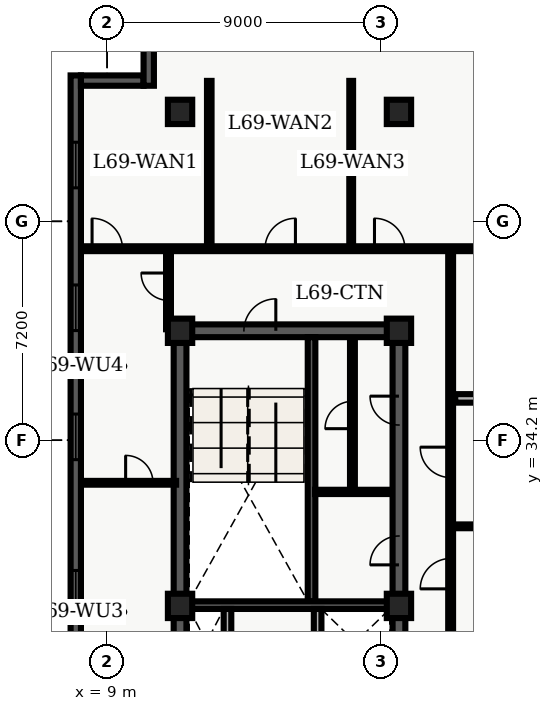
"""IFC4 building model, lengths in metres.
Left out: names, types, materials, properties, quantities, classifications, styles, units other than length and angle.
Written with IfcOpenShell. Run it as: python <this file> out.ifc"""

import sys

from ifc_helpers import new_model, entity, si_unit, converted_unit, direction, frame, origin_with_axes, origin_2d_with_axis, place, context, subcontext, project, spatial, polyline, rectangle, outline, extrude, element, fill, save


model = new_model("IFC4")
c1 = context("Model", 3, precision=1e-05, world=origin_with_axes(), true_north=direction((0.0, 1.0)))
c2 = subcontext(c1, "Body", "Model", "MODEL_VIEW")
j1 = project(units=[si_unit("LENGTHUNIT", "METRE"), converted_unit("PLANEANGLEUNIT", "DEGREE", entity("IfcPlaneAngleMeasure", 0.017), si_unit("PLANEANGLEUNIT", "RADIAN"), dimensions=[0, 0, 0, 0, 0, 0, 0])], contexts=[c1])
p1 = place(None, origin_with_axes())
s1 = spatial("IfcSite", under=j1, at=p1, CompositionType="ELEMENT")
p2 = place(p1, origin_with_axes())
s2 = spatial("IfcBuilding", under=s1, at=p2, CompositionType="ELEMENT")
p3 = place(p2, frame((0.0, 0.0, 280.2), z_axis=(0.0, 0.0, 1.0), x_axis=(1.0, 0.0, 0.0)))
s3 = spatial("IfcBuildingStorey", under=s2, at=p3, CompositionType="ELEMENT", Elevation=280.2)
p4 = place(p3, frame((11.4, 10.8, 0.0), z_axis=(0.0, 0.0, 1.0), x_axis=(0.0, 1.0, 0.0)))
e1 = element("IfcWall", 1, at=p4, inside=s3, PredefinedType="SHEAR", context=c2, shape_type="SweptSolid", body=[
    extrude(outline(polyline([(0.0, -0.21), (27.0, -0.21), (27.0, 0.21), (0.0, 0.21), (0.0, -0.21)])), origin_with_axes(), (0.0, 0.0, 1.0), 3.66),
])
p5 = place(p3, frame((11.4, 37.8, 0.0), z_axis=(0.0, 0.0, 1.0), x_axis=(1.0, 0.0, 0.0)))
e2 = element("IfcWall", 2, at=p5, inside=s3, PredefinedType="SHEAR", context=c2, shape_type="SweptSolid", body=[
    extrude(outline(polyline([(0.0, -0.21), (7.2, -0.21), (7.2, 0.21), (0.0, 0.21), (0.0, -0.21)])), origin_with_axes(), (0.0, 0.0, 1.0), 3.66),
])
p6 = place(p5, frame((2.625, 0.0, 0.0), z_axis=(0.0, 0.0, 1.0), x_axis=(1.0, 0.0, 0.0)))
e3 = element("IfcOpeningElement", 3, at=p6, cuts=e2, PredefinedType="OPENING", context=c2, shape_type="SweptSolid", body=[
    extrude(rectangle(XDim=1.05, YDim=0.44, at=origin_2d_with_axis()), origin_with_axes(), (0.0, 0.0, 1.0), 2.15),
])
p7 = place(p3, frame((18.6, 24.3, 0.0), z_axis=(0.0, 0.0, 1.0), x_axis=(0.0, 1.0, 0.0)))
e4 = element("IfcWall", 4, at=p7, inside=s3, PredefinedType="SHEAR", context=c2, shape_type="SweptSolid", body=[
    extrude(outline(polyline([(0.0, -0.21), (13.5, -0.21), (13.5, 0.21), (0.0, 0.21), (0.0, -0.21)])), origin_with_axes(), (0.0, 0.0, 1.0), 3.66),
])
p8 = place(p7, frame((6.275, 0.0, 0.0), z_axis=(0.0, 0.0, 1.0), x_axis=(1.0, 0.0, 0.0)))
e5 = element("IfcOpeningElement", 5, at=p8, cuts=e4, PredefinedType="OPENING", context=c2, shape_type="SweptSolid", body=[
    extrude(rectangle(XDim=0.95, YDim=0.44, at=origin_2d_with_axis()), origin_with_axes(), (0.0, 0.0, 1.0), 2.15),
])
p9 = place(p7, frame((10.875, 0.0, 0.0), z_axis=(0.0, 0.0, 1.0), x_axis=(1.0, 0.0, 0.0)))
e6 = element("IfcOpeningElement", 6, at=p9, cuts=e4, PredefinedType="OPENING", context=c2, shape_type="SweptSolid", body=[
    extrude(rectangle(XDim=0.95, YDim=0.44, at=origin_2d_with_axis()), origin_with_axes(), (0.0, 0.0, 1.0), 2.15),
])
p10 = place(p3, frame((15.725, 28.9, 0.0), z_axis=(0.0, 0.0, 1.0), x_axis=(0.0, 1.0, 0.0)))
e7 = element("IfcWall", 7, at=p10, inside=s3, PredefinedType="SHEAR", context=c2, shape_type="SweptSolid", body=[
    extrude(outline(polyline([(0.0, -0.125), (8.69, -0.125), (8.69, 0.125), (0.0, 0.125), (0.0, -0.125)])), origin_with_axes(), (0.0, 0.0, 1.0), 3.66),
])
p11 = place(p3, frame((11.61, 28.775, 0.0), z_axis=(0.0, 0.0, 1.0), x_axis=(1.0, 0.0, 0.0)))
e8 = element("IfcWall", 8, at=p11, inside=s3, PredefinedType="SHEAR", context=c2, shape_type="SweptSolid", body=[
    extrude(outline(polyline([(0.0, -0.125), (6.78, -0.125), (6.78, 0.125), (0.0, 0.125), (0.0, -0.125)])), origin_with_axes(), (0.0, 0.0, 1.0), 3.66),
])
for number, where, z_axis, x_axis in (
    (9, (12.96, 26.45, 0.0), (0.0, 0.0, 1.0), (0.0, 1.0, 0.0)),
    (10, (15.925, 26.45, 0.0), (0.0, 0.0, 1.0), (0.0, 1.0, 0.0)),
):
    element("IfcWall", number, at=place(p3, frame(where, z_axis=z_axis, x_axis=x_axis)), inside=s3, PredefinedType="SOLIDWALL", context=c2, shape_type="SweptSolid", body=[
        extrude(outline(polyline([(0.0, -0.125), (2.2, -0.125), (2.2, 0.125), (0.0, 0.125), (0.0, -0.125)])), origin_with_axes(), (0.0, 0.0, 1.0), 2.7),
    ])
for number, where, z_axis, x_axis in (
    (11, (11.4, 28.75, 0.0), (0.0, 0.0, 1.0), (1.0, 0.0, 0.0)),
    (12, (11.4, 37.8, 0.0), (0.0, 0.0, 1.0), (1.0, 0.0, 0.0)),
    (13, (11.4, 45.0, 0.0), (0.0, 0.0, 1.0), (1.0, 0.0, 0.0)),
    (14, (18.6, 28.75, 0.0), (0.0, 0.0, 1.0), (1.0, 0.0, 0.0)),
    (15, (18.6, 37.8, 0.0), (0.0, 0.0, 1.0), (1.0, 0.0, 0.0)),
    (16, (18.6, 45.0, 0.0), (0.0, 0.0, 1.0), (1.0, 0.0, 0.0)),
):
    element("IfcColumn", number, at=place(p3, frame(where, z_axis=z_axis, x_axis=x_axis)), inside=s3, PredefinedType="COLUMN", context=c2, shape_type="SweptSolid", body=[
        extrude(rectangle(XDim=0.8, YDim=0.8, at=origin_2d_with_axis()), origin_with_axes(), (0.0, 0.0, 1.0), 3.9),
    ])
p12 = place(p3, frame((15.84, 32.5, 0.0), z_axis=(0.0, 0.0, 1.0), x_axis=(1.0, 0.0, 0.0)))
e17 = element("IfcWall", 17, at=p12, inside=s3, PredefinedType="PARTITIONING", context=c2, shape_type="SweptSolid", body=[
    extrude(outline(polyline([(0.0, -0.07), (2.46, -0.07), (2.46, 0.07), (0.0, 0.07), (0.0, -0.07)])), origin_with_axes(), (0.0, 0.0, 1.0), 2.7),
])
p13 = place(p3, frame((17.07, 32.58, 0.0), z_axis=(0.0, 0.0, 1.0), x_axis=(0.0, 1.0, 0.0)))
e18 = element("IfcWall", 18, at=p13, inside=s3, PredefinedType="PARTITIONING", context=c2, shape_type="SweptSolid", body=[
    extrude(outline(polyline([(0.0, -0.08), (4.92, -0.08), (4.92, 0.08), (0.0, 0.08), (0.0, -0.08)])), origin_with_axes(), (0.0, 0.0, 1.0), 2.7),
])
p14 = place(p13, frame((2.45, 0.0, 0.0), z_axis=(0.0, 0.0, 1.0), x_axis=(1.0, 0.0, 0.0)))
e19 = element("IfcOpeningElement", 19, at=p14, cuts=e18, PredefinedType="OPENING", context=c2, shape_type="SweptSolid", body=[
    extrude(rectangle(XDim=0.9, YDim=0.18, at=origin_2d_with_axis()), origin_with_axes(), (0.0, 0.0, 1.0), 2.15),
])
p15 = place(p3, frame((8.135, 40.5, 0.0), z_axis=(0.0, 0.0, 1.0), x_axis=(1.0, 0.0, 0.0)))
e20 = element("IfcWall", 20, at=p15, inside=s3, PredefinedType="PARTITIONING", context=c2, shape_type="SweptSolid", body=[
    extrude(outline(polyline([(0.0, -0.08), (23.93, -0.08), (23.93, 0.08), (0.0, 0.08), (0.0, -0.08)])), origin_with_axes(), (0.0, 0.0, 1.0), 2.7),
])
p16 = place(p15, frame((0.871, 0.0, 0.0), z_axis=(0.0, 0.0, 1.0), x_axis=(1.0, 0.0, 0.0)))
e21 = element("IfcOpeningElement", 21, at=p16, cuts=e20, PredefinedType="OPENING", context=c2, shape_type="SweptSolid", body=[
    extrude(rectangle(XDim=1.0, YDim=0.18, at=origin_2d_with_axis()), origin_with_axes(), (0.0, 0.0, 1.0), 2.15),
])
p17 = place(p15, frame((6.56, 0.0, 0.0), z_axis=(0.0, 0.0, 1.0), x_axis=(1.0, 0.0, 0.0)))
e22 = element("IfcOpeningElement", 22, at=p17, cuts=e20, PredefinedType="OPENING", context=c2, shape_type="SweptSolid", body=[
    extrude(rectangle(XDim=1.0, YDim=0.18, at=origin_2d_with_axis()), origin_with_axes(), (0.0, 0.0, 1.0), 2.15),
])
p18 = place(p15, frame((10.16, 0.0, 0.0), z_axis=(0.0, 0.0, 1.0), x_axis=(1.0, 0.0, 0.0)))
e23 = element("IfcOpeningElement", 23, at=p18, cuts=e20, PredefinedType="OPENING", context=c2, shape_type="SweptSolid", body=[
    extrude(rectangle(XDim=1.0, YDim=0.18, at=origin_2d_with_axis()), origin_with_axes(), (0.0, 0.0, 1.0), 2.15),
])
p19 = place(p3, frame((20.3, 7.8, 0.0), z_axis=(0.0, 0.0, 1.0), x_axis=(0.0, 1.0, 0.0)))
e24 = element("IfcWall", 24, at=p19, inside=s3, PredefinedType="PARTITIONING", context=c2, shape_type="SweptSolid", body=[
    extrude(outline(polyline([(0.0, -0.08), (32.7, -0.08), (32.7, 0.08), (0.0, 0.08), (0.0, -0.08)])), origin_with_axes(), (0.0, 0.0, 1.0), 2.7),
])
p20 = place(p19, frame((14.2, 0.0, 0.0), z_axis=(0.0, 0.0, 1.0), x_axis=(1.0, 0.0, 0.0)))
e25 = element("IfcOpeningElement", 25, at=p20, cuts=e24, PredefinedType="OPENING", context=c2, shape_type="SweptSolid", body=[
    extrude(rectangle(XDim=1.0, YDim=0.18, at=origin_2d_with_axis()), origin_with_axes(), (0.0, 0.0, 1.0), 2.15),
])
p21 = place(p19, frame((18.24, 0.0, 0.0), z_axis=(0.0, 0.0, 1.0), x_axis=(1.0, 0.0, 0.0)))
e26 = element("IfcOpeningElement", 26, at=p21, cuts=e24, PredefinedType="OPENING", context=c2, shape_type="SweptSolid", body=[
    extrude(rectangle(XDim=1.0, YDim=0.18, at=origin_2d_with_axis()), origin_with_axes(), (0.0, 0.0, 1.0), 2.15),
])
p22 = place(p19, frame((22.011, 0.0, 0.0), z_axis=(0.0, 0.0, 1.0), x_axis=(1.0, 0.0, 0.0)))
e27 = element("IfcOpeningElement", 27, at=p22, cuts=e24, PredefinedType="OPENING", context=c2, shape_type="SweptSolid", body=[
    extrude(rectangle(XDim=1.0, YDim=0.18, at=origin_2d_with_axis()), origin_with_axes(), (0.0, 0.0, 1.0), 2.15),
])
p23 = place(p19, frame((25.672, 0.0, 0.0), z_axis=(0.0, 0.0, 1.0), x_axis=(1.0, 0.0, 0.0)))
e28 = element("IfcOpeningElement", 28, at=p23, cuts=e24, PredefinedType="OPENING", context=c2, shape_type="SweptSolid", body=[
    extrude(rectangle(XDim=1.0, YDim=0.18, at=origin_2d_with_axis()), origin_with_axes(), (0.0, 0.0, 1.0), 2.15),
])
p24 = place(p19, frame((6.675, 0.0, 0.0), z_axis=(0.0, 0.0, 1.0), x_axis=(1.0, 0.0, 0.0)))
e29 = element("IfcOpeningElement", 29, at=p24, cuts=e24, PredefinedType="OPENING", context=c2, shape_type="SweptSolid", body=[
    extrude(rectangle(XDim=1.05, YDim=0.18, at=origin_2d_with_axis()), origin_with_axes(), (0.0, 0.0, 1.0), 2.15),
])
p25 = place(p3, frame((11.02, 37.85, 0.0), z_axis=(0.0, 0.0, 1.0), x_axis=(0.0, 1.0, 0.0)))
e30 = element("IfcWall", 30, at=p25, inside=s3, PredefinedType="PARTITIONING", context=c2, shape_type="SweptSolid", body=[
    extrude(outline(polyline([(0.0, -0.08), (2.65, -0.08), (2.65, 0.08), (0.0, 0.08), (0.0, -0.08)])), origin_with_axes(), (0.0, 0.0, 1.0), 2.7),
])
p26 = place(p25, frame((1.4, 0.0, 0.0), z_axis=(0.0, 0.0, 1.0), x_axis=(1.0, 0.0, 0.0)))
e31 = element("IfcOpeningElement", 31, at=p26, cuts=e30, PredefinedType="OPENING", context=c2, shape_type="SweptSolid", body=[
    extrude(rectangle(XDim=0.9, YDim=0.18, at=origin_2d_with_axis()), origin_with_axes(), (0.0, 0.0, 1.0), 2.15),
])
p27 = place(p3, frame((8.135, 32.8, 0.0), z_axis=(0.0, 0.0, 1.0), x_axis=(1.0, 0.0, 0.0)))
e32 = element("IfcWall", 32, at=p27, inside=s3, PredefinedType="PARTITIONING", context=c2, shape_type="SweptSolid", body=[
    extrude(outline(polyline([(0.0, -0.062), (3.135, -0.062), (3.135, 0.062), (0.0, 0.062), (0.0, -0.062)])), origin_with_axes(), (0.0, 0.0, 1.0), 2.7),
])
p28 = place(p27, frame((1.925, 0.0, 0.0), z_axis=(0.0, 0.0, 1.0), x_axis=(1.0, 0.0, 0.0)))
e33 = element("IfcOpeningElement", 33, at=p28, cuts=e32, PredefinedType="OPENING", context=c2, shape_type="SweptSolid", body=[
    extrude(rectangle(XDim=0.9, YDim=0.145, at=origin_2d_with_axis()), origin_with_axes(), (0.0, 0.0, 1.0), 2.15),
])
p29 = place(p3, frame((12.361, 40.6, 0.0), z_axis=(0.0, 0.0, 1.0), x_axis=(0.0, 1.0, 0.0)))
e34 = element("IfcWall", 34, at=p29, inside=s3, PredefinedType="PARTITIONING", context=c2, shape_type="SweptSolid", body=[
    extrude(outline(polyline([(0.0, -0.075), (5.42, -0.075), (5.42, 0.075), (0.0, 0.075), (0.0, -0.075)])), origin_with_axes(), (0.0, 0.0, 1.0), 2.7),
])
p30 = place(p3, frame((17.029, 40.6, 0.0), z_axis=(0.0, 0.0, 1.0), x_axis=(0.0, 1.0, 0.0)))
e35 = element("IfcWall", 35, at=p30, inside=s3, PredefinedType="PARTITIONING", context=c2, shape_type="SweptSolid", body=[
    extrude(outline(polyline([(0.0, -0.062), (5.42, -0.062), (5.42, 0.062), (0.0, 0.062), (0.0, -0.062)])), origin_with_axes(), (0.0, 0.0, 1.0), 2.7),
])
p31 = place(p3, frame((20.45, 31.368, 0.0), z_axis=(0.0, 0.0, 1.0), x_axis=(1.0, 0.0, 0.0)))
e36 = element("IfcWall", 36, at=p31, inside=s3, PredefinedType="PARTITIONING", context=c2, shape_type="SweptSolid", body=[
    extrude(outline(polyline([(0.0, -0.062), (11.615, -0.062), (11.615, 0.062), (0.0, 0.062), (0.0, -0.062)])), origin_with_axes(), (0.0, 0.0, 1.0), 2.7),
])
p32 = place(p3, frame((20.45, 35.576, 0.0), z_axis=(0.0, 0.0, 1.0), x_axis=(1.0, 0.0, 0.0)))
e37 = element("IfcWall", 37, at=p32, inside=s3, PredefinedType="PARTITIONING", context=c2, shape_type="SweptSolid", body=[
    extrude(outline(polyline([(0.0, -0.14), (11.615, -0.14), (11.615, 0.14), (0.0, 0.14), (0.0, -0.14)])), origin_with_axes(), (0.0, 0.0, 1.0), 2.7),
])
p33 = place(p32, frame((5.785, 0.0, 0.0), z_axis=(0.0, 0.0, 1.0), x_axis=(1.0, 0.0, 0.0)))
e38 = element("IfcOpeningElement", 38, at=p33, cuts=e37, PredefinedType="OPENING", context=c2, shape_type="SweptSolid", body=[
    extrude(rectangle(XDim=0.95, YDim=0.3, at=origin_2d_with_axis()), origin_with_axes(), (0.0, 0.0, 1.0), 2.15),
])
p34 = place(p3, frame((7.97, 2.74, 0.0), z_axis=(0.0, 0.0, 1.0), x_axis=(0.0, 1.0, 0.0)))
e39 = element("IfcWall", 39, at=p34, inside=s3, PredefinedType="SOLIDWALL", context=c2, shape_type="SweptSolid", body=[
    extrude(outline(polyline([(0.0, -0.17), (43.46, -0.17), (43.46, 0.17), (0.0, 0.17), (0.0, -0.17)])), origin_with_axes(), (0.0, 0.0, 1.0), 3.66),
])
p35 = place(p34, frame((2.948, 0.0, 0.45), z_axis=(0.0, 0.0, 1.0), x_axis=(1.0, 0.0, 0.0)))
e40 = element("IfcOpeningElement", 40, at=p35, cuts=e39, PredefinedType="OPENING", context=c2, shape_type="SweptSolid", body=[
    extrude(rectangle(XDim=1.5, YDim=0.36, at=origin_2d_with_axis()), origin_with_axes(), (0.0, 0.0, 1.0), 2.1),
])
p36 = place(p34, frame((7.643, 0.0, 0.45), z_axis=(0.0, 0.0, 1.0), x_axis=(1.0, 0.0, 0.0)))
e41 = element("IfcOpeningElement", 41, at=p36, cuts=e39, PredefinedType="OPENING", context=c2, shape_type="SweptSolid", body=[
    extrude(rectangle(XDim=1.5, YDim=0.36, at=origin_2d_with_axis()), origin_with_axes(), (0.0, 0.0, 1.0), 2.1),
])
p37 = place(p34, frame((17.034, 0.0, 0.45), z_axis=(0.0, 0.0, 1.0), x_axis=(1.0, 0.0, 0.0)))
e42 = element("IfcOpeningElement", 42, at=p37, cuts=e39, PredefinedType="OPENING", context=c2, shape_type="SweptSolid", body=[
    extrude(rectangle(XDim=1.5, YDim=0.36, at=origin_2d_with_axis()), origin_with_axes(), (0.0, 0.0, 1.0), 2.1),
])
p38 = place(p34, frame((26.426, 0.0, 0.45), z_axis=(0.0, 0.0, 1.0), x_axis=(1.0, 0.0, 0.0)))
e43 = element("IfcOpeningElement", 43, at=p38, cuts=e39, PredefinedType="OPENING", context=c2, shape_type="SweptSolid", body=[
    extrude(rectangle(XDim=1.5, YDim=0.36, at=origin_2d_with_axis()), origin_with_axes(), (0.0, 0.0, 1.0), 2.1),
])
p39 = place(p34, frame((31.571, 0.0, 0.45), z_axis=(0.0, 0.0, 1.0), x_axis=(1.0, 0.0, 0.0)))
e44 = element("IfcOpeningElement", 44, at=p39, cuts=e39, PredefinedType="OPENING", context=c2, shape_type="SweptSolid", body=[
    extrude(rectangle(XDim=1.5, YDim=0.36, at=origin_2d_with_axis()), origin_with_axes(), (0.0, 0.0, 1.0), 2.1),
])
p40 = place(p34, frame((35.817, 0.0, 0.45), z_axis=(0.0, 0.0, 1.0), x_axis=(1.0, 0.0, 0.0)))
e45 = element("IfcOpeningElement", 45, at=p40, cuts=e39, PredefinedType="OPENING", context=c2, shape_type="SweptSolid", body=[
    extrude(rectangle(XDim=1.5, YDim=0.36, at=origin_2d_with_axis()), origin_with_axes(), (0.0, 0.0, 1.0), 2.1),
])
p41 = place(p34, frame((40.512, 0.0, 0.45), z_axis=(0.0, 0.0, 1.0), x_axis=(1.0, 0.0, 0.0)))
e46 = element("IfcOpeningElement", 46, at=p41, cuts=e39, PredefinedType="OPENING", context=c2, shape_type="SweptSolid", body=[
    extrude(rectangle(XDim=1.5, YDim=0.36, at=origin_2d_with_axis()), origin_with_axes(), (0.0, 0.0, 1.0), 2.1),
])
p42 = place(p3, frame((8.14, 46.03, 0.0), z_axis=(0.0, 0.0, 1.0), x_axis=(1.0, 0.0, 0.0)))
e47 = element("IfcWall", 47, at=p42, inside=s3, PredefinedType="SOLIDWALL", context=c2, shape_type="SweptSolid", body=[
    extrude(outline(polyline([(0.0, -0.17), (2.06, -0.17), (2.06, 0.17), (0.0, 0.17), (0.0, -0.17)])), origin_with_axes(), (0.0, 0.0, 1.0), 3.66),
])
p43 = place(p3, frame((10.37, 45.86, 0.0), z_axis=(0.0, 0.0, 1.0), x_axis=(0.0, 1.0, 0.0)))
e48 = element("IfcWall", 48, at=p43, inside=s3, PredefinedType="SOLIDWALL", context=c2, shape_type="SweptSolid", body=[
    extrude(outline(polyline([(0.0, -0.17), (2.74, -0.17), (2.74, 0.17), (0.0, 0.17), (0.0, -0.17)])), origin_with_axes(), (0.0, 0.0, 1.0), 3.66),
])
p44 = place(p5, frame((2.625, 0.0, 0.0), z_axis=(0.0, 0.0, 1.0), x_axis=(1.0, 0.0, 0.0)))
e49 = element("IfcDoor", 49, at=p44, inside=s3, OperationType="SINGLE_SWING_RIGHT", PredefinedType="DOOR", context=c2, shape_type="SweptSolid", body=[
    extrude(rectangle(XDim=1.05, YDim=0.09, at=origin_2d_with_axis()), origin_with_axes(), (0.0, 0.0, 1.0), 2.15),
])
fill(e3, e49)
p45 = place(p7, frame((6.275, 0.0, 0.0), z_axis=(0.0, 0.0, 1.0), x_axis=(1.0, 0.0, 0.0)))
e50 = element("IfcDoor", 50, at=p45, inside=s3, OperationType="SINGLE_SWING_LEFT", PredefinedType="DOOR", context=c2, shape_type="SweptSolid", body=[
    extrude(rectangle(XDim=0.95, YDim=0.09, at=origin_2d_with_axis()), origin_with_axes(), (0.0, 0.0, 1.0), 2.15),
])
fill(e5, e50)
p46 = place(p13, frame((2.45, 0.0, 0.0), z_axis=(0.0, 0.0, 1.0), x_axis=(1.0, 0.0, 0.0)))
e51 = element("IfcDoor", 51, at=p46, inside=s3, OperationType="SINGLE_SWING_LEFT", PredefinedType="DOOR", context=c2, shape_type="SweptSolid", body=[
    extrude(rectangle(XDim=0.9, YDim=0.09, at=origin_2d_with_axis()), origin_with_axes(), (0.0, 0.0, 1.0), 2.15),
])
fill(e19, e51)
p47 = place(p7, frame((10.875, 0.0, 0.0), z_axis=(0.0, 0.0, 1.0), x_axis=(1.0, 0.0, 0.0)))
e52 = element("IfcDoor", 52, at=p47, inside=s3, OperationType="SINGLE_SWING_RIGHT", PredefinedType="DOOR", context=c2, shape_type="SweptSolid", body=[
    extrude(rectangle(XDim=0.95, YDim=0.09, at=origin_2d_with_axis()), origin_with_axes(), (0.0, 0.0, 1.0), 2.15),
])
fill(e6, e52)
p48 = place(p27, frame((1.925, 0.0, 0.0), z_axis=(0.0, 0.0, 1.0), x_axis=(1.0, 0.0, 0.0)))
e53 = element("IfcDoor", 53, at=p48, inside=s3, OperationType="SINGLE_SWING_LEFT", PredefinedType="DOOR", context=c2, shape_type="SweptSolid", body=[
    extrude(rectangle(XDim=0.9, YDim=0.075, at=origin_2d_with_axis()), origin_with_axes(), (0.0, 0.0, 1.0), 2.15),
])
fill(e33, e53)
p49 = place(p25, frame((1.4, 0.0, 0.0), z_axis=(0.0, 0.0, 1.0), x_axis=(1.0, 0.0, 0.0)))
e54 = element("IfcDoor", 54, at=p49, inside=s3, OperationType="SINGLE_SWING_RIGHT", PredefinedType="DOOR", context=c2, shape_type="SweptSolid", body=[
    extrude(rectangle(XDim=0.9, YDim=0.09, at=origin_2d_with_axis()), origin_with_axes(), (0.0, 0.0, 1.0), 2.15),
])
fill(e31, e54)
p50 = place(p15, frame((0.871, 0.0, 0.0), z_axis=(0.0, 0.0, 1.0), x_axis=(1.0, 0.0, 0.0)))
e55 = element("IfcDoor", 55, at=p50, inside=s3, OperationType="SINGLE_SWING_LEFT", PredefinedType="DOOR", context=c2, shape_type="SweptSolid", body=[
    extrude(rectangle(XDim=1.0, YDim=0.09, at=origin_2d_with_axis()), origin_with_axes(), (0.0, 0.0, 1.0), 2.15),
])
fill(e21, e55)
p51 = place(p15, frame((6.56, 0.0, 0.0), z_axis=(0.0, 0.0, 1.0), x_axis=(1.0, 0.0, 0.0)))
e56 = element("IfcDoor", 56, at=p51, inside=s3, OperationType="SINGLE_SWING_RIGHT", PredefinedType="DOOR", context=c2, shape_type="SweptSolid", body=[
    extrude(rectangle(XDim=1.0, YDim=0.09, at=origin_2d_with_axis()), origin_with_axes(), (0.0, 0.0, 1.0), 2.15),
])
fill(e22, e56)
p52 = place(p15, frame((10.16, 0.0, 0.0), z_axis=(0.0, 0.0, 1.0), x_axis=(1.0, 0.0, 0.0)))
e57 = element("IfcDoor", 57, at=p52, inside=s3, OperationType="SINGLE_SWING_LEFT", PredefinedType="DOOR", context=c2, shape_type="SweptSolid", body=[
    extrude(rectangle(XDim=1.0, YDim=0.09, at=origin_2d_with_axis()), origin_with_axes(), (0.0, 0.0, 1.0), 2.15),
])
fill(e23, e57)
p53 = place(p19, frame((22.011, 0.0, 0.0), z_axis=(0.0, 0.0, 1.0), x_axis=(1.0, 0.0, 0.0)))
e58 = element("IfcDoor", 58, at=p53, inside=s3, OperationType="SINGLE_SWING_LEFT", PredefinedType="DOOR", context=c2, shape_type="SweptSolid", body=[
    extrude(rectangle(XDim=1.0, YDim=0.09, at=origin_2d_with_axis()), origin_with_axes(), (0.0, 0.0, 1.0), 2.15),
])
fill(e27, e58)
p54 = place(p19, frame((25.672, 0.0, 0.0), z_axis=(0.0, 0.0, 1.0), x_axis=(1.0, 0.0, 0.0)))
e59 = element("IfcDoor", 59, at=p54, inside=s3, OperationType="SINGLE_SWING_RIGHT", PredefinedType="DOOR", context=c2, shape_type="SweptSolid", body=[
    extrude(rectangle(XDim=1.0, YDim=0.09, at=origin_2d_with_axis()), origin_with_axes(), (0.0, 0.0, 1.0), 2.15),
])
fill(e28, e59)
p55 = place(p34, frame((26.426, 0.0, 0.45), z_axis=(0.0, 0.0, 1.0), x_axis=(1.0, 0.0, 0.0)))
e60 = element("IfcWindow", 60, at=p55, inside=s3, PredefinedType="WINDOW", context=c2, shape_type="SweptSolid", body=[
    extrude(rectangle(XDim=1.5, YDim=0.09, at=origin_2d_with_axis()), origin_with_axes(), (0.0, 0.0, 1.0), 2.1),
])
fill(e43, e60)
p56 = place(p34, frame((31.571, 0.0, 0.45), z_axis=(0.0, 0.0, 1.0), x_axis=(1.0, 0.0, 0.0)))
e61 = element("IfcWindow", 61, at=p56, inside=s3, PredefinedType="WINDOW", context=c2, shape_type="SweptSolid", body=[
    extrude(rectangle(XDim=1.5, YDim=0.09, at=origin_2d_with_axis()), origin_with_axes(), (0.0, 0.0, 1.0), 2.1),
])
fill(e44, e61)
p57 = place(p34, frame((35.817, 0.0, 0.45), z_axis=(0.0, 0.0, 1.0), x_axis=(1.0, 0.0, 0.0)))
e62 = element("IfcWindow", 62, at=p57, inside=s3, PredefinedType="WINDOW", context=c2, shape_type="SweptSolid", body=[
    extrude(rectangle(XDim=1.5, YDim=0.09, at=origin_2d_with_axis()), origin_with_axes(), (0.0, 0.0, 1.0), 2.1),
])
fill(e45, e62)
p58 = place(p34, frame((40.512, 0.0, 0.45), z_axis=(0.0, 0.0, 1.0), x_axis=(1.0, 0.0, 0.0)))
e63 = element("IfcWindow", 63, at=p58, inside=s3, PredefinedType="WINDOW", context=c2, shape_type="SweptSolid", body=[
    extrude(rectangle(XDim=1.5, YDim=0.09, at=origin_2d_with_axis()), origin_with_axes(), (0.0, 0.0, 1.0), 2.1),
])
fill(e46, e63)
save(model, sys.argv[1])
